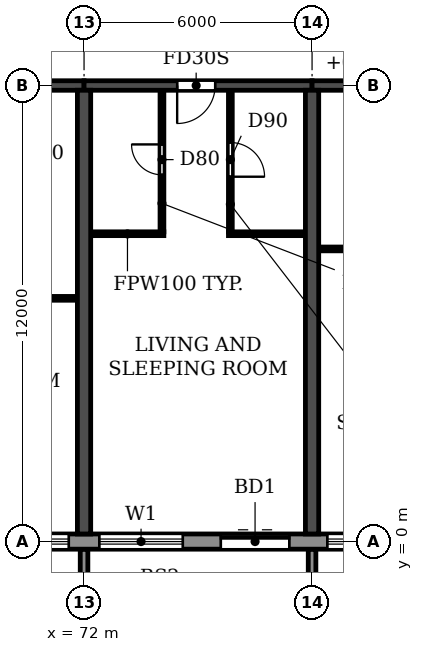
"""IFC4 building model, lengths in metres.
Left out: names, types, materials, properties, quantities, classifications, styles, units other than length and angle.
Written with IfcOpenShell. Run it as: python <this file> out.ifc"""

import sys

from ifc_helpers import new_model, si_unit, direction, frame, frame_2d, origin, place, context, subcontext, project, spatial, polyline, rectangle, outline, extrude, source, transform, mapped, element, fill, save


model = new_model("IFC4")
c1 = context("Model", 3, precision=1e-05, world=origin(), true_north=direction((0.0, 1.0)))
c2 = subcontext(c1, "Body", "Model", "MODEL_VIEW")
j1 = project(units=[si_unit("LENGTHUNIT", "METRE"), si_unit("PLANEANGLEUNIT", "RADIAN")], contexts=[c1])
p1 = place(None, origin())
s1 = spatial("IfcSite", under=j1, at=p1, CompositionType="ELEMENT")
p2 = place(p1, origin())
s2 = spatial("IfcBuilding", under=s1, at=p2, CompositionType="ELEMENT")
p3 = place(p2, frame((0.0, 0.0, 92.7)))
s3 = spatial("IfcBuildingStorey", under=s2, at=p3, CompositionType="ELEMENT", Elevation=92.7)
for number, where, z_axis, x_axis in (
    (1, (72.0, 0.2, 0.0), (0.0, 0.0, 1.0), (0.0, 1.0, 0.0)),
    (2, (78.0, 0.2, 0.0), (0.0, 0.0, 1.0), (0.0, 1.0, 0.0)),
):
    element("IfcWall", number, at=place(p3, frame(where, z_axis=z_axis, x_axis=x_axis)), inside=s3, PredefinedType="SHEAR", context=c2, shape_type="SweptSolid", body=[
        extrude(rectangle(XDim=11.675, YDim=0.35, at=frame_2d((5.837, 0.0))), origin(), (0.0, 0.0, 1.0), 3.06),
    ])
p4 = place(p3, frame((66.0, 12.0, 0.0), z_axis=(0.0, 0.0, 1.0), x_axis=(1.0, 0.0, 0.0)))
e3 = element("IfcWall", 3, at=p4, inside=s3, PredefinedType="SHEAR", context=c2, shape_type="SweptSolid", body=[
    extrude(rectangle(XDim=6.0, YDim=0.25, at=frame_2d((3.0, 0.0))), origin(), (0.0, 0.0, 1.0), 2.46),
])
p5 = place(p4, frame((2.55, 0.0, 0.0)))
e4 = element("IfcOpeningElement", 4, at=p5, cuts=e3, PredefinedType="OPENING", context=c2, shape_type="SweptSolid", body=[
    extrude(rectangle(XDim=1.0, YDim=2.1, at=frame_2d((0.5, 1.05))), frame((0.0, 0.135, 0.0), z_axis=(0.0, -1.0, 0.0), x_axis=(1.0, 0.0, 0.0)), (0.0, 0.0, 1.0), 0.27),
])
p6 = place(p3, frame((72.0, 12.0, 0.0), z_axis=(0.0, 0.0, 1.0), x_axis=(1.0, 0.0, 0.0)))
e5 = element("IfcWall", 5, at=p6, inside=s3, PredefinedType="SHEAR", context=c2, shape_type="SweptSolid", body=[
    extrude(rectangle(XDim=6.0, YDim=0.25, at=frame_2d((3.0, 0.0))), origin(), (0.0, 0.0, 1.0), 2.46),
])
p7 = place(p6, frame((2.45, 0.0, 0.0)))
e6 = element("IfcOpeningElement", 6, at=p7, cuts=e5, PredefinedType="OPENING", context=c2, shape_type="SweptSolid", body=[
    extrude(rectangle(XDim=1.0, YDim=2.1, at=frame_2d((0.5, 1.05))), frame((0.0, 0.135, 0.0), z_axis=(0.0, -1.0, 0.0), x_axis=(1.0, 0.0, 0.0)), (0.0, 0.0, 1.0), 0.27),
])
p8 = place(p3, frame((78.0, 12.0, 0.0), z_axis=(0.0, 0.0, 1.0), x_axis=(1.0, 0.0, 0.0)))
e7 = element("IfcWall", 7, at=p8, inside=s3, PredefinedType="SHEAR", context=c2, shape_type="SweptSolid", body=[
    extrude(rectangle(XDim=6.0, YDim=0.25, at=frame_2d((3.0, 0.0))), origin(), (0.0, 0.0, 1.0), 2.46),
])
p9 = place(p8, frame((2.45, 0.0, 0.0)))
e8 = element("IfcOpeningElement", 8, at=p9, cuts=e7, PredefinedType="OPENING", context=c2, shape_type="SweptSolid", body=[
    extrude(rectangle(XDim=1.0, YDim=2.1, at=frame_2d((0.5, 1.05))), frame((0.0, 0.135, 0.0), z_axis=(0.0, -1.0, 0.0), x_axis=(1.0, 0.0, 0.0)), (0.0, 0.0, 1.0), 0.27),
])
p10 = place(p3, frame((10.683, 0.0, 0.0), z_axis=(0.0, 0.0, 1.0), x_axis=(1.0, 0.0, 0.0)))
e9 = element("IfcWall", 9, at=p10, inside=s3, PredefinedType="STANDARD", context=c2, shape_type="SweptSolid", body=[
    extrude(rectangle(XDim=80.634, YDim=0.4, at=frame_2d((40.317, 0.0))), origin(), (0.0, 0.0, 1.0), 3.06),
])
p11 = place(p10, frame((1.717, 0.0, 0.9)))
e10 = element("IfcOpeningElement", 10, at=p11, cuts=e9, PredefinedType="OPENING", context=c2, shape_type="SweptSolid", body=[
    extrude(rectangle(XDim=2.2, YDim=1.5, at=frame_2d((1.1, 0.75))), frame((0.0, 0.21, 0.0), z_axis=(0.0, -1.0, 0.0), x_axis=(1.0, 0.0, 0.0)), (0.0, 0.0, 1.0), 0.42),
])
p12 = place(p10, frame((4.917, 0.0, 0.0)))
e11 = element("IfcOpeningElement", 11, at=p12, cuts=e9, PredefinedType="OPENING", context=c2, shape_type="SweptSolid", body=[
    extrude(rectangle(XDim=1.8, YDim=2.4, at=frame_2d((0.9, 1.2))), frame((0.0, 0.21, 0.0), z_axis=(0.0, -1.0, 0.0), x_axis=(1.0, 0.0, 0.0)), (0.0, 0.0, 1.0), 0.42),
])
p13 = place(p10, frame((7.717, 0.0, 0.9)))
e12 = element("IfcOpeningElement", 12, at=p13, cuts=e9, PredefinedType="OPENING", context=c2, shape_type="SweptSolid", body=[
    extrude(rectangle(XDim=2.2, YDim=1.5, at=frame_2d((1.1, 0.75))), frame((0.0, 0.21, 0.0), z_axis=(0.0, -1.0, 0.0), x_axis=(1.0, 0.0, 0.0)), (0.0, 0.0, 1.0), 0.42),
])
p14 = place(p10, frame((10.717, 0.0, 0.9)))
e13 = element("IfcOpeningElement", 13, at=p14, cuts=e9, PredefinedType="OPENING", context=c2, shape_type="SweptSolid", body=[
    extrude(rectangle(XDim=2.2, YDim=1.5, at=frame_2d((1.1, 0.75))), frame((0.0, 0.21, 0.0), z_axis=(0.0, -1.0, 0.0), x_axis=(1.0, 0.0, 0.0)), (0.0, 0.0, 1.0), 0.42),
])
p15 = place(p10, frame((13.717, 0.0, 0.9)))
e14 = element("IfcOpeningElement", 14, at=p15, cuts=e9, PredefinedType="OPENING", context=c2, shape_type="SweptSolid", body=[
    extrude(rectangle(XDim=2.2, YDim=1.5, at=frame_2d((1.1, 0.75))), frame((0.0, 0.21, 0.0), z_axis=(0.0, -1.0, 0.0), x_axis=(1.0, 0.0, 0.0)), (0.0, 0.0, 1.0), 0.42),
])
p16 = place(p10, frame((16.717, 0.0, 0.9)))
e15 = element("IfcOpeningElement", 15, at=p16, cuts=e9, PredefinedType="OPENING", context=c2, shape_type="SweptSolid", body=[
    extrude(rectangle(XDim=2.2, YDim=1.5, at=frame_2d((1.1, 0.75))), frame((0.0, 0.21, 0.0), z_axis=(0.0, -1.0, 0.0), x_axis=(1.0, 0.0, 0.0)), (0.0, 0.0, 1.0), 0.42),
])
p17 = place(p10, frame((19.717, 0.0, 0.9)))
e16 = element("IfcOpeningElement", 16, at=p17, cuts=e9, PredefinedType="OPENING", context=c2, shape_type="SweptSolid", body=[
    extrude(rectangle(XDim=2.2, YDim=1.5, at=frame_2d((1.1, 0.75))), frame((0.0, 0.21, 0.0), z_axis=(0.0, -1.0, 0.0), x_axis=(1.0, 0.0, 0.0)), (0.0, 0.0, 1.0), 0.42),
])
p18 = place(p10, frame((22.717, 0.0, 0.9)))
e17 = element("IfcOpeningElement", 17, at=p18, cuts=e9, PredefinedType="OPENING", context=c2, shape_type="SweptSolid", body=[
    extrude(rectangle(XDim=2.2, YDim=1.5, at=frame_2d((1.1, 0.75))), frame((0.0, 0.21, 0.0), z_axis=(0.0, -1.0, 0.0), x_axis=(1.0, 0.0, 0.0)), (0.0, 0.0, 1.0), 0.42),
])
p19 = place(p10, frame((25.717, 0.0, 0.9)))
e18 = element("IfcOpeningElement", 18, at=p19, cuts=e9, PredefinedType="OPENING", context=c2, shape_type="SweptSolid", body=[
    extrude(rectangle(XDim=2.2, YDim=1.5, at=frame_2d((1.1, 0.75))), frame((0.0, 0.21, 0.0), z_axis=(0.0, -1.0, 0.0), x_axis=(1.0, 0.0, 0.0)), (0.0, 0.0, 1.0), 0.42),
])
p20 = place(p10, frame((28.917, 0.0, 0.0)))
e19 = element("IfcOpeningElement", 19, at=p20, cuts=e9, PredefinedType="OPENING", context=c2, shape_type="SweptSolid", body=[
    extrude(rectangle(XDim=1.8, YDim=2.4, at=frame_2d((0.9, 1.2))), frame((0.0, 0.21, 0.0), z_axis=(0.0, -1.0, 0.0), x_axis=(1.0, 0.0, 0.0)), (0.0, 0.0, 1.0), 0.42),
])
p21 = place(p10, frame((31.717, 0.0, 0.9)))
e20 = element("IfcOpeningElement", 20, at=p21, cuts=e9, PredefinedType="OPENING", context=c2, shape_type="SweptSolid", body=[
    extrude(rectangle(XDim=2.2, YDim=1.5, at=frame_2d((1.1, 0.75))), frame((0.0, 0.21, 0.0), z_axis=(0.0, -1.0, 0.0), x_axis=(1.0, 0.0, 0.0)), (0.0, 0.0, 1.0), 0.42),
])
p22 = place(p10, frame((34.717, 0.0, 0.9)))
e21 = element("IfcOpeningElement", 21, at=p22, cuts=e9, PredefinedType="OPENING", context=c2, shape_type="SweptSolid", body=[
    extrude(rectangle(XDim=2.2, YDim=1.5, at=frame_2d((1.1, 0.75))), frame((0.0, 0.21, 0.0), z_axis=(0.0, -1.0, 0.0), x_axis=(1.0, 0.0, 0.0)), (0.0, 0.0, 1.0), 0.42),
])
p23 = place(p10, frame((37.917, 0.0, 0.0)))
e22 = element("IfcOpeningElement", 22, at=p23, cuts=e9, PredefinedType="OPENING", context=c2, shape_type="SweptSolid", body=[
    extrude(rectangle(XDim=1.8, YDim=2.4, at=frame_2d((0.9, 1.2))), frame((0.0, 0.21, 0.0), z_axis=(0.0, -1.0, 0.0), x_axis=(1.0, 0.0, 0.0)), (0.0, 0.0, 1.0), 0.42),
])
p24 = place(p10, frame((40.717, 0.0, 0.9)))
e23 = element("IfcOpeningElement", 23, at=p24, cuts=e9, PredefinedType="OPENING", context=c2, shape_type="SweptSolid", body=[
    extrude(rectangle(XDim=2.2, YDim=1.5, at=frame_2d((1.1, 0.75))), frame((0.0, 0.21, 0.0), z_axis=(0.0, -1.0, 0.0), x_axis=(1.0, 0.0, 0.0)), (0.0, 0.0, 1.0), 0.42),
])
p25 = place(p10, frame((43.717, 0.0, 0.9)))
e24 = element("IfcOpeningElement", 24, at=p25, cuts=e9, PredefinedType="OPENING", context=c2, shape_type="SweptSolid", body=[
    extrude(rectangle(XDim=2.2, YDim=1.5, at=frame_2d((1.1, 0.75))), frame((0.0, 0.21, 0.0), z_axis=(0.0, -1.0, 0.0), x_axis=(1.0, 0.0, 0.0)), (0.0, 0.0, 1.0), 0.42),
])
p26 = place(p10, frame((46.717, 0.0, 0.9)))
e25 = element("IfcOpeningElement", 25, at=p26, cuts=e9, PredefinedType="OPENING", context=c2, shape_type="SweptSolid", body=[
    extrude(rectangle(XDim=2.2, YDim=1.5, at=frame_2d((1.1, 0.75))), frame((0.0, 0.21, 0.0), z_axis=(0.0, -1.0, 0.0), x_axis=(1.0, 0.0, 0.0)), (0.0, 0.0, 1.0), 0.42),
])
p27 = place(p10, frame((49.717, 0.0, 0.9)))
e26 = element("IfcOpeningElement", 26, at=p27, cuts=e9, PredefinedType="OPENING", context=c2, shape_type="SweptSolid", body=[
    extrude(rectangle(XDim=2.2, YDim=1.5, at=frame_2d((1.1, 0.75))), frame((0.0, 0.21, 0.0), z_axis=(0.0, -1.0, 0.0), x_axis=(1.0, 0.0, 0.0)), (0.0, 0.0, 1.0), 0.42),
])
p28 = place(p10, frame((52.917, 0.0, 0.0)))
e27 = element("IfcOpeningElement", 27, at=p28, cuts=e9, PredefinedType="OPENING", context=c2, shape_type="SweptSolid", body=[
    extrude(rectangle(XDim=1.8, YDim=2.4, at=frame_2d((0.9, 1.2))), frame((0.0, 0.21, 0.0), z_axis=(0.0, -1.0, 0.0), x_axis=(1.0, 0.0, 0.0)), (0.0, 0.0, 1.0), 0.42),
])
p29 = place(p10, frame((55.717, 0.0, 0.9)))
e28 = element("IfcOpeningElement", 28, at=p29, cuts=e9, PredefinedType="OPENING", context=c2, shape_type="SweptSolid", body=[
    extrude(rectangle(XDim=2.2, YDim=1.5, at=frame_2d((1.1, 0.75))), frame((0.0, 0.21, 0.0), z_axis=(0.0, -1.0, 0.0), x_axis=(1.0, 0.0, 0.0)), (0.0, 0.0, 1.0), 0.42),
])
p30 = place(p10, frame((58.717, 0.0, 0.9)))
e29 = element("IfcOpeningElement", 29, at=p30, cuts=e9, PredefinedType="OPENING", context=c2, shape_type="SweptSolid", body=[
    extrude(rectangle(XDim=2.2, YDim=1.5, at=frame_2d((1.1, 0.75))), frame((0.0, 0.21, 0.0), z_axis=(0.0, -1.0, 0.0), x_axis=(1.0, 0.0, 0.0)), (0.0, 0.0, 1.0), 0.42),
])
p31 = place(p10, frame((61.717, 0.0, 0.9)))
e30 = element("IfcOpeningElement", 30, at=p31, cuts=e9, PredefinedType="OPENING", context=c2, shape_type="SweptSolid", body=[
    extrude(rectangle(XDim=2.2, YDim=1.5, at=frame_2d((1.1, 0.75))), frame((0.0, 0.21, 0.0), z_axis=(0.0, -1.0, 0.0), x_axis=(1.0, 0.0, 0.0)), (0.0, 0.0, 1.0), 0.42),
])
p32 = place(p10, frame((64.917, 0.0, 0.0)))
e31 = element("IfcOpeningElement", 31, at=p32, cuts=e9, PredefinedType="OPENING", context=c2, shape_type="SweptSolid", body=[
    extrude(rectangle(XDim=1.8, YDim=2.4, at=frame_2d((0.9, 1.2))), frame((0.0, 0.21, 0.0), z_axis=(0.0, -1.0, 0.0), x_axis=(1.0, 0.0, 0.0)), (0.0, 0.0, 1.0), 0.42),
])
p33 = place(p10, frame((67.717, 0.0, 0.9)))
e32 = element("IfcOpeningElement", 32, at=p33, cuts=e9, PredefinedType="OPENING", context=c2, shape_type="SweptSolid", body=[
    extrude(rectangle(XDim=2.2, YDim=1.5, at=frame_2d((1.1, 0.75))), frame((0.0, 0.21, 0.0), z_axis=(0.0, -1.0, 0.0), x_axis=(1.0, 0.0, 0.0)), (0.0, 0.0, 1.0), 0.42),
])
p34 = place(p10, frame((70.717, 0.0, 0.9)))
e33 = element("IfcOpeningElement", 33, at=p34, cuts=e9, PredefinedType="OPENING", context=c2, shape_type="SweptSolid", body=[
    extrude(rectangle(XDim=2.2, YDim=1.5, at=frame_2d((1.1, 0.75))), frame((0.0, 0.21, 0.0), z_axis=(0.0, -1.0, 0.0), x_axis=(1.0, 0.0, 0.0)), (0.0, 0.0, 1.0), 0.42),
])
p35 = place(p10, frame((73.917, 0.0, 0.0)))
e34 = element("IfcOpeningElement", 34, at=p35, cuts=e9, PredefinedType="OPENING", context=c2, shape_type="SweptSolid", body=[
    extrude(rectangle(XDim=1.8, YDim=2.4, at=frame_2d((0.9, 1.2))), frame((0.0, 0.21, 0.0), z_axis=(0.0, -1.0, 0.0), x_axis=(1.0, 0.0, 0.0)), (0.0, 0.0, 1.0), 0.42),
])
p36 = place(p10, frame((76.717, 0.0, 0.9)))
e35 = element("IfcOpeningElement", 35, at=p36, cuts=e9, PredefinedType="OPENING", context=c2, shape_type="SweptSolid", body=[
    extrude(rectangle(XDim=2.2, YDim=1.5, at=frame_2d((1.1, 0.75))), frame((0.0, 0.21, 0.0), z_axis=(0.0, -1.0, 0.0), x_axis=(1.0, 0.0, 0.0)), (0.0, 0.0, 1.0), 0.42),
])
m1 = source(origin(), c2, "Body", "SweptSolid", [
    extrude(outline(polyline([(0.0, 0.0), (0.2, 0.0), (0.2, 1.65), (0.0, 1.65), (0.0, 0.0)])), origin(), (0.0, 0.0, 1.0), 3.1),
])
for number, where in (
    (36, (71.9, -1.85, 0.0)),
    (37, (77.9, -1.85, 0.0)),
):
    element("IfcWall", number, at=place(p3, frame(where)), inside=s3, PredefinedType="STANDARD", context=c2, shape_type="MappedRepresentation", body=[
        mapped(m1, transform((0.0, 0.0, 0.0))),
    ])
for number, where, z_axis, x_axis in (
    (38, (69.9, 6.4, 0.0), (0.0, 0.0, 1.0), (1.0, 0.0, 0.0)),
    (39, (78.185, 7.7, 0.0), (0.0, 0.0, 1.0), (1.0, 0.0, 0.0)),
    (40, (72.185, 8.1, 0.0), (0.0, 0.0, 1.0), (1.0, 0.0, 0.0)),
):
    element("IfcWall", number, at=place(p3, frame(where, z_axis=z_axis, x_axis=x_axis)), inside=s3, PredefinedType="PARTITIONING", context=c2, shape_type="SweptSolid", body=[
        extrude(rectangle(XDim=1.915, YDim=0.1, at=frame_2d((0.958, 0.0))), origin(), (0.0, 0.0, 1.0), 3.06),
    ])
p37 = place(p3, frame((75.8, 8.1, 0.0), z_axis=(0.0, 0.0, 1.0), x_axis=(1.0, 0.0, 0.0)))
e41 = element("IfcWall", 41, at=p37, inside=s3, PredefinedType="PARTITIONING", context=c2, shape_type="SweptSolid", body=[
    extrude(rectangle(XDim=2.015, YDim=0.1, at=frame_2d((1.007, 0.0))), origin(), (0.0, 0.0, 1.0), 3.06),
])
p38 = place(p3, frame((74.05, 8.15, 0.0), z_axis=(0.0, 0.0, 1.0), x_axis=(0.0, 1.0, 0.0)))
e42 = element("IfcWall", 42, at=p38, inside=s3, PredefinedType="PARTITIONING", context=c2, shape_type="SweptSolid", body=[
    extrude(rectangle(XDim=3.715, YDim=0.1, at=frame_2d((1.857, 0.0))), origin(), (0.0, 0.0, 1.0), 3.06),
])
p39 = place(p38, frame((1.5, 0.0, 0.0)))
e43 = element("IfcOpeningElement", 43, at=p39, cuts=e42, PredefinedType="OPENING", context=c2, shape_type="SweptSolid", body=[
    extrude(rectangle(XDim=0.8, YDim=2.1, at=frame_2d((0.4, 1.05))), frame((0.0, 0.06, 0.0), z_axis=(0.0, -1.0, 0.0), x_axis=(1.0, 0.0, 0.0)), (0.0, 0.0, 1.0), 0.12),
])
p40 = place(p3, frame((75.85, 8.15, 0.0), z_axis=(0.0, 0.0, 1.0), x_axis=(0.0, 1.0, 0.0)))
e44 = element("IfcWall", 44, at=p40, inside=s3, PredefinedType="PARTITIONING", context=c2, shape_type="SweptSolid", body=[
    extrude(rectangle(XDim=3.715, YDim=0.1, at=frame_2d((1.857, 0.0))), origin(), (0.0, 0.0, 1.0), 3.06),
])
p41 = place(p40, frame((1.45, 0.0, 0.0)))
e45 = element("IfcOpeningElement", 45, at=p41, cuts=e44, PredefinedType="OPENING", context=c2, shape_type="SweptSolid", body=[
    extrude(rectangle(XDim=0.9, YDim=2.1, at=frame_2d((0.45, 1.05))), frame((0.0, 0.06, 0.0), z_axis=(0.0, -1.0, 0.0), x_axis=(1.0, 0.0, 0.0)), (0.0, 0.0, 1.0), 0.12),
])
p42 = place(p30, origin())
e46 = element("IfcWindow", 46, at=p42, inside=s3, PartitioningType="DOUBLE_PANEL_HORIZONTAL", PredefinedType="WINDOW", context=c2, shape_type="SweptSolid", body=[
    extrude(rectangle(XDim=2.2, YDim=1.5, at=frame_2d((1.1, 0.75))), frame((0.0, 0.03, 0.0), z_axis=(0.0, -1.0, 0.0), x_axis=(1.0, 0.0, 0.0)), (0.0, 0.0, 1.0), 0.06),
])
fill(e29, e46)
p43 = place(p31, origin())
e47 = element("IfcWindow", 47, at=p43, inside=s3, PartitioningType="DOUBLE_PANEL_HORIZONTAL", PredefinedType="WINDOW", context=c2, shape_type="SweptSolid", body=[
    extrude(rectangle(XDim=2.2, YDim=1.5, at=frame_2d((1.1, 0.75))), frame((0.0, 0.03, 0.0), z_axis=(0.0, -1.0, 0.0), x_axis=(1.0, 0.0, 0.0)), (0.0, 0.0, 1.0), 0.06),
])
fill(e30, e47)
p44 = place(p32, origin())
e48 = element("IfcDoor", 48, at=p44, inside=s3, OperationType="DOUBLE_DOOR_SLIDING", PredefinedType="DOOR", context=c2, shape_type="SweptSolid", body=[
    extrude(rectangle(XDim=1.8, YDim=2.4, at=frame_2d((0.9, 1.2))), frame((0.0, 0.025, 0.0), z_axis=(0.0, -1.0, 0.0), x_axis=(1.0, 0.0, 0.0)), (0.0, 0.0, 1.0), 0.05),
])
fill(e31, e48)
p45 = place(p33, origin())
e49 = element("IfcWindow", 49, at=p45, inside=s3, PartitioningType="DOUBLE_PANEL_HORIZONTAL", PredefinedType="WINDOW", context=c2, shape_type="SweptSolid", body=[
    extrude(rectangle(XDim=2.2, YDim=1.5, at=frame_2d((1.1, 0.75))), frame((0.0, 0.03, 0.0), z_axis=(0.0, -1.0, 0.0), x_axis=(1.0, 0.0, 0.0)), (0.0, 0.0, 1.0), 0.06),
])
fill(e32, e49)
p46 = place(p39, origin())
e50 = element("IfcDoor", 50, at=p46, inside=s3, OperationType="SINGLE_SWING_RIGHT", PredefinedType="DOOR", context=c2, shape_type="SweptSolid", body=[
    extrude(rectangle(XDim=0.8, YDim=2.1, at=frame_2d((0.4, 1.05))), frame((0.0, 0.025, 0.0), z_axis=(0.0, -1.0, 0.0), x_axis=(1.0, 0.0, 0.0)), (0.0, 0.0, 1.0), 0.05),
])
fill(e43, e50)
p47 = place(p7, frame((1.0, 0.0, 0.0), z_axis=(0.0, 0.0, 1.0), x_axis=(-1.0, 0.0, 0.0)))
e51 = element("IfcDoor", 51, at=p47, inside=s3, OperationType="SINGLE_SWING_RIGHT", PredefinedType="DOOR", context=c2, shape_type="SweptSolid", body=[
    extrude(rectangle(XDim=1.0, YDim=2.1, at=frame_2d((0.5, 1.05))), frame((0.0, 0.025, 0.0), z_axis=(0.0, -1.0, 0.0), x_axis=(1.0, 0.0, 0.0)), (0.0, 0.0, 1.0), 0.05),
])
fill(e6, e51)
p48 = place(p41, frame((0.9, 0.0, 0.0), z_axis=(0.0, 0.0, 1.0), x_axis=(-1.0, 0.0, 0.0)))
e52 = element("IfcDoor", 52, at=p48, inside=s3, OperationType="SINGLE_SWING_RIGHT", PredefinedType="DOOR", context=c2, shape_type="SweptSolid", body=[
    extrude(rectangle(XDim=0.9, YDim=2.1, at=frame_2d((0.45, 1.05))), frame((0.0, 0.025, 0.0), z_axis=(0.0, -1.0, 0.0), x_axis=(1.0, 0.0, 0.0)), (0.0, 0.0, 1.0), 0.05),
])
fill(e45, e52)
save(model, sys.argv[1])
